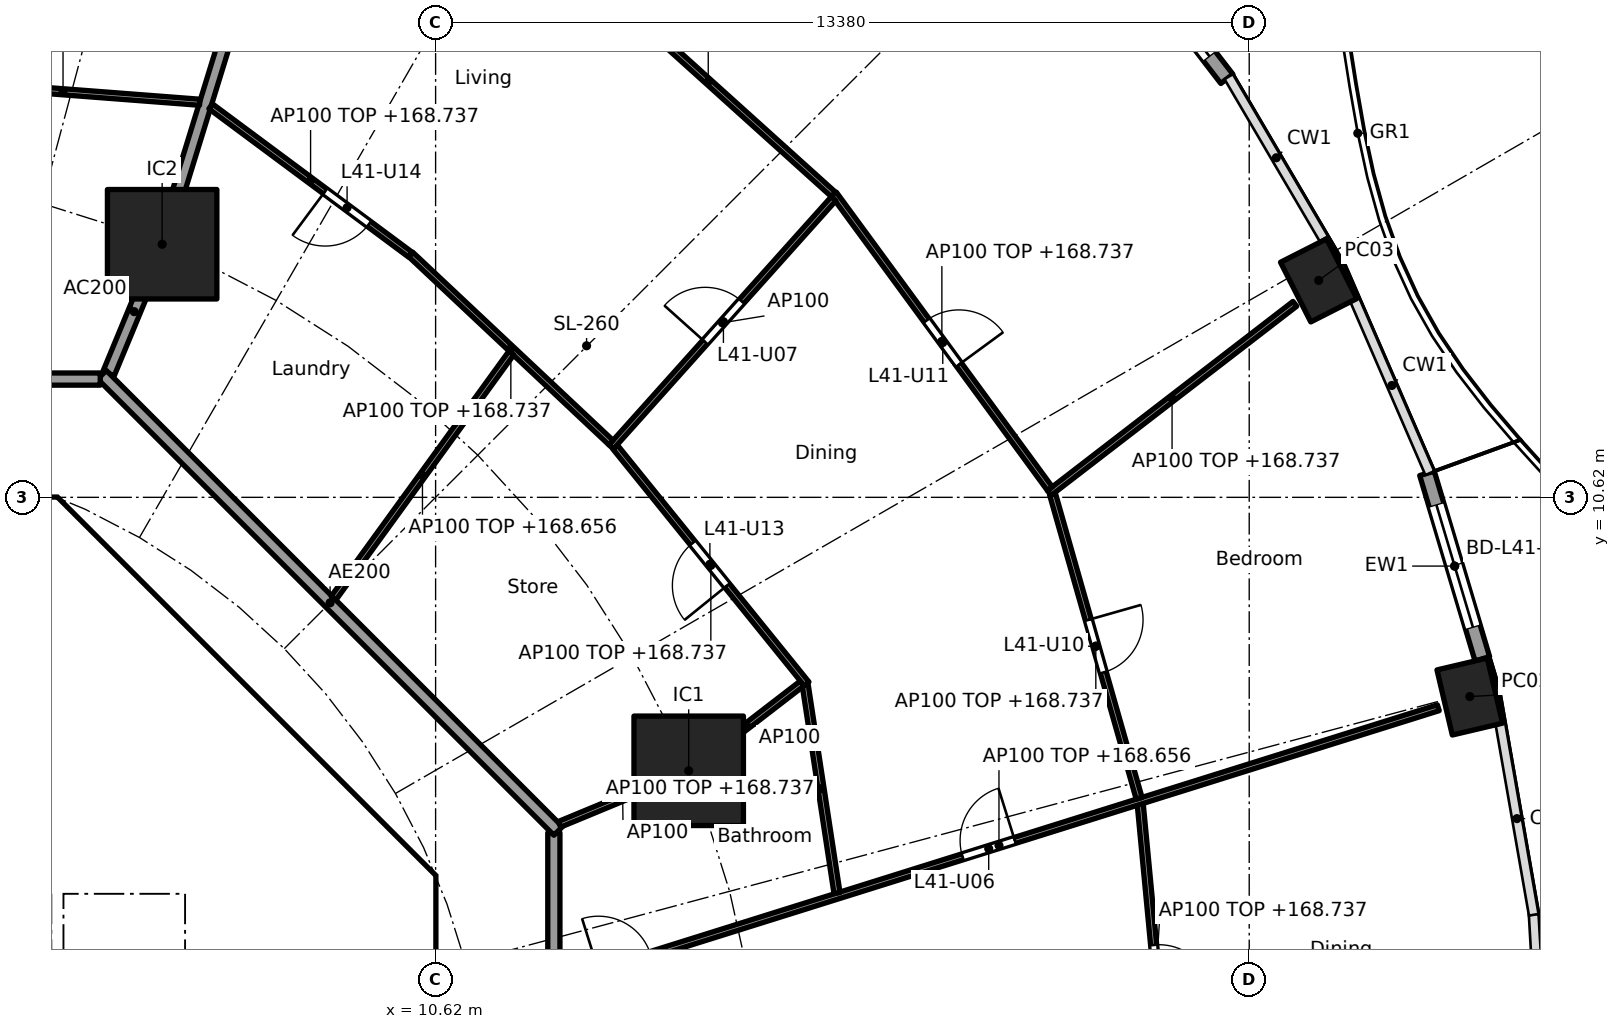
"""IFC4 building model, lengths in metres.
Left out: names, types, materials, properties, quantities, classifications, styles, units other than length and angle.
Written with IfcOpenShell. Run it as: python <this file> out.ifc"""

import sys

from ifc_helpers import new_model, si_unit, direction, frame, frame_2d, origin, origin_2d, place, context, subcontext, project, spatial, polyline, rectangle, hollow_rectangle, outline, extrude, element, fill, save


model = new_model("IFC4")
c1 = context("Model", 3, precision=1e-05, world=origin(), true_north=direction((0.0, 1.0)))
c2 = subcontext(c1, "Body", "Model", "MODEL_VIEW")
j1 = project(units=[si_unit("LENGTHUNIT", "METRE"), si_unit("PLANEANGLEUNIT", "RADIAN")], contexts=[c1])
p1 = place(None, origin())
s1 = spatial("IfcSite", under=j1, at=p1, CompositionType="ELEMENT")
p2 = place(p1, origin())
s2 = spatial("IfcBuilding", under=s1, at=p2, CompositionType="ELEMENT")
p3 = place(p2, frame((0.0, 0.0, 165.9)))
s3 = spatial("IfcBuildingStorey", under=s2, at=p3, CompositionType="ELEMENT", Elevation=165.9)
for number, where, z_axis, x_axis in (
    (1, (27.627, 7.344, -0.26), (0.0, 0.0, 1.0), (-0.229, 0.973, 0.0)),
    (2, (25.142, 14.188, -0.26), (0.0, 0.0, 1.0), (-0.452, 0.892, 0.0)),
):
    element("IfcColumn", number, at=place(p3, frame(where, z_axis=z_axis, x_axis=x_axis)), inside=s3, PredefinedType="COLUMN", context=c2, shape_type="SweptSolid", body=[
        extrude(hollow_rectangle(XDim=1.1, YDim=0.85, WallThickness=0.036, at=origin_2d()), origin(), (0.0, 0.0, 1.0), 3.96),
    ])
for number, where, z_axis, x_axis in (
    (3, (14.782, 6.123, 0.0), (0.0, 0.0, 1.0), (1.0, 0.0, 0.0)),
    (4, (6.123, 14.782, 0.0), (0.0, 0.0, 1.0), (1.0, 0.0, 0.0)),
):
    element("IfcColumn", number, at=place(p3, frame(where, z_axis=z_axis, x_axis=x_axis)), inside=s3, PredefinedType="COLUMN", context=c2, shape_type="SweptSolid", body=[
        extrude(rectangle(XDim=1.8, YDim=1.8, at=origin_2d()), origin(), (0.0, 0.0, 1.0), 3.7),
    ])
p4 = place(p3, frame((26.924, 11.014, 0.0), z_axis=(0.0, 0.0, 1.0), x_axis=(0.28584838049, -0.958274857946, 0.0)))
e5 = element("IfcWall", 5, at=p4, inside=s3, PredefinedType="SOLIDWALL", context=c2, shape_type="SweptSolid", body=[
    extrude(rectangle(XDim=3.182, YDim=0.25, at=frame_2d((1.591, 0.0))), origin(), (0.0, 0.0, 1.0), 3.44),
])
p5 = place(p4, frame((0.541, 0.0, 0.0)))
e6 = element("IfcOpeningElement", 6, at=p5, cuts=e5, PredefinedType="OPENING", context=c2, shape_type="SweptSolid", body=[
    extrude(rectangle(XDim=2.1, YDim=2.4, at=frame_2d((1.05, 1.2))), frame((0.0, 0.135, 0.0), z_axis=(0.0, -1.0, 0.0), x_axis=(1.0, 0.0, 0.0)), (0.0, 0.0, 1.0), 0.27),
])
p6 = place(p3, frame((21.78, 19.906, 0.0), z_axis=(0.0, 0.0, 1.0), x_axis=(0.610437428894, -0.79206448311, 0.0)))
e7 = element("IfcWall", 7, at=p6, inside=s3, PredefinedType="SOLIDWALL", context=c2, shape_type="SweptSolid", body=[
    extrude(rectangle(XDim=3.035, YDim=0.25, at=frame_2d((1.518, 0.0))), origin(), (0.0, 0.0, 1.0), 3.44),
])
p7 = place(p6, frame((0.468, 0.0, 0.0)))
e8 = element("IfcOpeningElement", 8, at=p7, cuts=e7, PredefinedType="OPENING", context=c2, shape_type="SweptSolid", body=[
    extrude(rectangle(XDim=2.1, YDim=2.4, at=frame_2d((1.05, 1.2))), frame((0.0, 0.135, 0.0), z_axis=(0.0, -1.0, 0.0), x_axis=(1.0, 0.0, 0.0)), (0.0, 0.0, 1.0), 0.27),
])
p8 = place(p3, frame((9.988, 4.613, 0.0), z_axis=(0.0, 0.0, 1.0), x_axis=(-0.707106781187, 0.707106781187, 0.0)))
e9 = element("IfcWall", 9, at=p8, inside=s3, PredefinedType="SHEAR", context=c2, shape_type="SweptSolid", body=[
    extrude(rectangle(XDim=7.602, YDim=0.6, at=frame_2d((3.801, 0.0))), origin(), (0.0, 0.0, 1.0), 3.44),
])
p9 = place(p8, frame((3.201, 0.0, 0.0)))
e10 = element("IfcOpeningElement", 10, at=p9, cuts=e9, PredefinedType="OPENING", context=c2, shape_type="SweptSolid", body=[
    extrude(rectangle(XDim=1.2, YDim=2.1, at=frame_2d((0.6, 1.05))), frame((0.0, 0.31, 0.0), z_axis=(0.0, -1.0, 0.0), x_axis=(1.0, 0.0, 0.0)), (0.0, 0.0, 1.0), 0.62),
])
p10 = place(p3, frame((6.7, 4.0, 0.0), z_axis=(0.0, 0.0, 1.0), x_axis=(1.0, 0.0, 0.0)))
e11 = element("IfcWall", 11, at=p10, inside=s3, PredefinedType="SOLIDWALL", context=c2, shape_type="SweptSolid", body=[
    extrude(rectangle(XDim=3.325, YDim=0.2, at=frame_2d((1.662, 0.0))), origin(), (0.0, 0.0, 1.0), 3.44),
])
p11 = place(p10, frame((1.25, 0.0, 0.0)))
e12 = element("IfcOpeningElement", 12, at=p11, cuts=e11, PredefinedType="OPENING", context=c2, shape_type="SweptSolid", body=[
    extrude(rectangle(XDim=1.1, YDim=2.1, at=frame_2d((0.55, 1.05))), frame((0.0, 0.11, 0.0), z_axis=(0.0, -1.0, 0.0), x_axis=(1.0, 0.0, 0.0)), (0.0, 0.0, 1.0), 0.22),
])
p12 = place(p3, origin())
e13 = element("IfcWall", 13, at=p12, inside=s3, PredefinedType="SHEAR", context=c2, shape_type="SweptSolid", body=[
    extrude(outline(polyline([(-4.152, 10.025), (-4.401, 9.776), (-4.825, 10.2), (-4.401, 10.625), (4.401, 10.625), (4.825, 10.2), (4.401, 9.776), (4.152, 10.025), (-4.152, 10.025)])), origin(), (0.0, 0.0, 1.0), 3.44),
])
p13 = place(p3, origin())
e14 = element("IfcWall", 14, at=p13, inside=s3, PredefinedType="SHEAR", context=c2, shape_type="SweptSolid", body=[
    extrude(outline(polyline([(9.776, -4.401), (10.025, -4.152), (10.025, -3.801), (10.025, 4.152), (9.776, 4.401), (10.2, 4.825), (10.625, 4.401), (10.625, -4.401), (10.2, -4.825), (9.776, -4.401)])), origin(), (0.0, 0.0, 1.0), 3.44),
])
p14 = place(p3, origin())
e15 = element("IfcWall", 15, at=p14, inside=s3, PredefinedType="SOLIDWALL", context=c2, shape_type="SweptSolid", body=[
    extrude(outline(polyline([(-6.7, 4.3), (6.7, 4.3), (6.7, 2.1), (6.5, 2.1), (6.5, 4.1), (4.5, 4.1), (4.5, 2.1), (4.3, 2.1), (4.3, 4.1), (2.3, 4.1), (2.3, 2.1), (2.1, 2.1), (2.1, 4.1), (0.1, 4.1), (0.1, 2.1), (-0.1, 2.1), (-0.1, 4.1), (-6.5, 4.1), (-6.5, 2.1), (-6.7, 2.1), (-6.7, 4.3)])), origin(), (0.0, 0.0, 1.0), 3.44),
])
p15 = place(p3, origin())
e16 = element("IfcWall", 16, at=p15, inside=s3, PredefinedType="SOLIDWALL", context=c2, shape_type="SweptSolid", body=[
    extrude(outline(polyline([(7.025, -3.9), (6.7, -3.9), (6.7, 3.9), (7.025, 3.9), (7.025, -3.9)])), origin(), (0.0, 0.0, 1.0), 3.44),
])
p16 = place(p3, frame((5.243, 12.657, 0.0), z_axis=(0.0, 0.0, 1.0), x_axis=(0.382747093259, 0.923853160736, 0.0)))
e17 = element("IfcWall", 17, at=p16, inside=s3, PredefinedType="PARTITIONING", context=c2, shape_type="SweptSolid", body=[
    extrude(rectangle(XDim=2.2, YDim=0.2, at=frame_2d((1.1, 0.0))), origin(), (0.0, 0.0, 1.0), 3.44),
])
p17 = place(p3, frame((6.138, 14.83, 0.0), z_axis=(0.0, 0.0, 1.0), x_axis=(0.294818517221, 0.955553264818, 0.0)))
e18 = element("IfcWall", 18, at=p17, inside=s3, PredefinedType="PARTITIONING", context=c2, shape_type="SweptSolid", body=[
    extrude(rectangle(XDim=12.619, YDim=0.2, at=frame_2d((6.31, 0.0))), origin(), (0.0, 0.0, 1.0), 2.837),
])
p18 = place(p3, frame((12.565, -5.104, 0.0), z_axis=(0.0, 0.0, 1.0), x_axis=(0.0, 1.0, 0.0)))
e19 = element("IfcWall", 19, at=p18, inside=s3, PredefinedType="PARTITIONING", context=c2, shape_type="SweptSolid", body=[
    extrude(rectangle(XDim=10.209, YDim=0.2, at=frame_2d((5.104, 0.0))), origin(), (0.0, 0.0, 1.0), 3.44),
])
p19 = place(p18, frame((5.906, 0.0, 0.0)))
e20 = element("IfcOpeningElement", 20, at=p19, cuts=e19, PredefinedType="OPENING", context=c2, shape_type="SweptSolid", body=[
    extrude(rectangle(XDim=1.0, YDim=2.1, at=frame_2d((0.5, 1.05))), frame((0.0, 0.11, 0.0), z_axis=(0.0, -1.0, 0.0), x_axis=(1.0, 0.0, 0.0)), (0.0, 0.0, 1.0), 0.22),
])
p20 = place(p3, frame((12.635, 5.134, 0.0), z_axis=(0.0, 0.0, 1.0), x_axis=(-0.707106781187, 0.707106781187, 0.0)))
e21 = element("IfcWall", 21, at=p20, inside=s3, PredefinedType="PARTITIONING", context=c2, shape_type="SweptSolid", body=[
    extrude(rectangle(XDim=10.609, YDim=0.2, at=frame_2d((5.305, 0.0))), origin(), (0.0, 0.0, 1.0), 3.44),
])
p21 = place(p3, frame((5.104, 12.565, 0.0), z_axis=(0.0, 0.0, 1.0), x_axis=(-1.0, 0.0, 0.0)))
e22 = element("IfcWall", 22, at=p21, inside=s3, PredefinedType="PARTITIONING", context=c2, shape_type="SweptSolid", body=[
    extrude(rectangle(XDim=10.409, YDim=0.2, at=frame_2d((5.205, 0.0))), origin(), (0.0, 0.0, 1.0), 3.44),
])
p22 = place(p21, frame((6.339, 0.0, 0.0)))
e23 = element("IfcOpeningElement", 23, at=p22, cuts=e22, PredefinedType="OPENING", context=c2, shape_type="SweptSolid", body=[
    extrude(rectangle(XDim=1.0, YDim=2.1, at=frame_2d((0.5, 1.05))), frame((0.0, 0.11, 0.0), z_axis=(0.0, -1.0, 0.0), x_axis=(1.0, 0.0, 0.0)), (0.0, 0.0, 1.0), 0.22),
])
p23 = place(p3, frame((22.734, 0.05, 0.0), z_axis=(0.0, 0.0, 1.0), x_axis=(-0.094923312677, 0.995484587882, 0.0)))
e24 = element("IfcWall", 24, at=p23, inside=s3, PredefinedType="PARTITIONING", context=c2, shape_type="SweptSolid", body=[
    extrude(rectangle(XDim=5.548, YDim=0.1, at=frame_2d((2.774, 0.0))), origin(), (0.0, 0.0, 1.0), 2.837),
])
p24 = place(p23, frame((2.324, 0.0, 0.0)))
e25 = element("IfcOpeningElement", 25, at=p24, cuts=e24, PredefinedType="OPENING", context=c2, shape_type="SweptSolid", body=[
    extrude(rectangle(XDim=0.9, YDim=2.1, at=frame_2d((0.45, 1.05))), frame((0.0, 0.06, 0.0), z_axis=(0.0, -1.0, 0.0), x_axis=(1.0, 0.0, 0.0)), (0.0, 0.0, 1.0), 0.12),
])
p25 = place(p3, frame((12.66, 2.632, 0.0), z_axis=(0.0, 0.0, 1.0), x_axis=(0.954248738607, 0.299013954302, 0.0)))
e26 = element("IfcWall", 26, at=p25, inside=s3, PredefinedType="PARTITIONING", context=c2, shape_type="SweptSolid", body=[
    extrude(rectangle(XDim=15.142, YDim=0.1, at=frame_2d((7.571, 0.0))), origin(), (0.0, 0.0, 1.0), 2.756),
])
p26 = place(p25, frame((0.669, 0.0, 0.0)))
e27 = element("IfcOpeningElement", 27, at=p26, cuts=e26, PredefinedType="OPENING", context=c2, shape_type="SweptSolid", body=[
    extrude(rectangle(XDim=0.9, YDim=2.1, at=frame_2d((0.45, 1.05))), frame((0.0, 0.06, 0.0), z_axis=(0.0, -1.0, 0.0), x_axis=(1.0, 0.0, 0.0)), (0.0, 0.0, 1.0), 0.12),
])
p27 = place(p25, frame((6.944, 0.0, 0.0)))
e28 = element("IfcOpeningElement", 28, at=p27, cuts=e26, PredefinedType="OPENING", context=c2, shape_type="SweptSolid", body=[
    extrude(rectangle(XDim=0.9, YDim=2.1, at=frame_2d((0.45, 1.05))), frame((0.0, 0.06, 0.0), z_axis=(0.0, -1.0, 0.0), x_axis=(1.0, 0.0, 0.0)), (0.0, 0.0, 1.0), 0.12),
])
p28 = place(p3, frame((17.221, 4.113, 0.0), z_axis=(0.0, 0.0, 1.0), x_axis=(-0.151078880423, 0.988521710379, 0.0)))
e29 = element("IfcWall", 29, at=p28, inside=s3, PredefinedType="PARTITIONING", context=c2, shape_type="SweptSolid", body=[
    extrude(rectangle(XDim=3.469, YDim=0.1, at=frame_2d((1.735, 0.0))), origin(), (0.0, 0.0, 1.0), 2.837),
])
p29 = place(p3, frame((22.189, 5.67, 0.0), z_axis=(0.0, 0.0, 1.0), x_axis=(-0.273815967041, 0.961782104322, 0.0)))
e30 = element("IfcWall", 30, at=p29, inside=s3, PredefinedType="PARTITIONING", context=c2, shape_type="SweptSolid", body=[
    extrude(rectangle(XDim=5.202, YDim=0.1, at=frame_2d((2.601, 0.0))), origin(), (0.0, 0.0, 1.0), 2.837),
])
p30 = place(p29, frame((2.151, 0.0, 0.0)))
e31 = element("IfcOpeningElement", 31, at=p30, cuts=e30, PredefinedType="OPENING", context=c2, shape_type="SweptSolid", body=[
    extrude(rectangle(XDim=0.9, YDim=2.1, at=frame_2d((0.45, 1.05))), frame((0.0, 0.06, 0.0), z_axis=(0.0, -1.0, 0.0), x_axis=(1.0, 0.0, 0.0)), (0.0, 0.0, 1.0), 0.12),
])
p31 = place(p3, frame((12.657, 5.243, 0.0), z_axis=(0.0, 0.0, 1.0), x_axis=(0.923826362943, 0.382811769845, 0.0)))
e32 = element("IfcWall", 32, at=p31, inside=s3, PredefinedType="PARTITIONING", context=c2, shape_type="SweptSolid", body=[
    extrude(rectangle(XDim=2.25, YDim=0.1, at=frame_2d((1.125, 0.0))), origin(), (0.0, 0.0, 1.0), 3.44),
])
p32 = place(p3, frame((14.822, 6.154, 0.0), z_axis=(0.0, 0.0, 1.0), x_axis=(0.792226528082, 0.610227111987, 0.0)))
e33 = element("IfcWall", 33, at=p32, inside=s3, PredefinedType="PARTITIONING", context=c2, shape_type="SweptSolid", body=[
    extrude(rectangle(XDim=2.307, YDim=0.1, at=frame_2d((1.154, 0.0))), origin(), (0.0, 0.0, 1.0), 3.44),
])
p33 = place(p3, frame((16.721, 7.553, 0.0), z_axis=(0.0, 0.0, 1.0), x_axis=(-0.628753513808, 0.777604667472, 0.0)))
e34 = element("IfcWall", 34, at=p33, inside=s3, PredefinedType="PARTITIONING", context=c2, shape_type="SweptSolid", body=[
    extrude(rectangle(XDim=5.007, YDim=0.1, at=frame_2d((2.504, 0.0))), origin(), (0.0, 0.0, 1.0), 2.837),
])
p34 = place(p33, frame((2.079, 0.0, 0.0)))
e35 = element("IfcOpeningElement", 35, at=p34, cuts=e34, PredefinedType="OPENING", context=c2, shape_type="SweptSolid", body=[
    extrude(rectangle(XDim=0.9, YDim=2.1, at=frame_2d((0.45, 1.05))), frame((0.0, 0.06, 0.0), z_axis=(0.0, -1.0, 0.0), x_axis=(1.0, 0.0, 0.0)), (0.0, 0.0, 1.0), 0.12),
])
p35 = place(p3, frame((20.712, 10.691, 0.0), z_axis=(0.0, 0.0, 1.0), x_axis=(0.79220362146, 0.610256849323, 0.0)))
e36 = element("IfcWall", 36, at=p35, inside=s3, PredefinedType="PARTITIONING", context=c2, shape_type="SweptSolid", body=[
    extrude(rectangle(XDim=5.098, YDim=0.1, at=frame_2d((2.549, 0.0))), origin(), (0.0, 0.0, 1.0), 2.837),
])
p36 = place(p3, frame((20.722, 10.762, 0.0), z_axis=(0.0, 0.0, 1.0), x_axis=(-0.591124135033, 0.806580595466, 0.0)))
e37 = element("IfcWall", 37, at=p36, inside=s3, PredefinedType="PARTITIONING", context=c2, shape_type="SweptSolid", body=[
    extrude(rectangle(XDim=6.01, YDim=0.1, at=frame_2d((3.005, 0.0))), origin(), (0.0, 0.0, 1.0), 2.837),
])
p37 = place(p36, frame((2.53, 0.0, 0.0)))
e38 = element("IfcOpeningElement", 38, at=p37, cuts=e37, PredefinedType="OPENING", context=c2, shape_type="SweptSolid", body=[
    extrude(rectangle(XDim=0.9, YDim=2.1, at=frame_2d((0.45, 1.05))), frame((0.0, 0.06, 0.0), z_axis=(0.0, -1.0, 0.0), x_axis=(1.0, 0.0, 0.0)), (0.0, 0.0, 1.0), 0.12),
])
p38 = place(p3, frame((13.507, 11.449, 0.0), z_axis=(0.0, 0.0, 1.0), x_axis=(0.667299792168, 0.744789223453, 0.0)))
e39 = element("IfcWall", 39, at=p38, inside=s3, PredefinedType="PARTITIONING", context=c2, shape_type="SweptSolid", body=[
    extrude(rectangle(XDim=5.482, YDim=0.1, at=frame_2d((2.741, 0.0))), origin(), (0.0, 0.0, 1.0), 3.44),
])
p39 = place(p38, frame((2.316, 0.0, 0.0)))
e40 = element("IfcOpeningElement", 40, at=p39, cuts=e39, PredefinedType="OPENING", context=c2, shape_type="SweptSolid", body=[
    extrude(rectangle(XDim=0.9, YDim=2.1, at=frame_2d((0.45, 1.05))), frame((0.0, 0.06, 0.0), z_axis=(0.0, -1.0, 0.0), x_axis=(1.0, 0.0, 0.0)), (0.0, 0.0, 1.0), 0.12),
])
p40 = place(p3, frame((13.504, 11.52, 0.0), z_axis=(0.0, 0.0, 1.0), x_axis=(-0.728883199496, 0.684638066055, 0.0)))
e41 = element("IfcWall", 41, at=p40, inside=s3, PredefinedType="PARTITIONING", context=c2, shape_type="SweptSolid", body=[
    extrude(rectangle(XDim=4.519, YDim=0.1, at=frame_2d((2.26, 0.0))), origin(), (0.0, 0.0, 1.0), 2.837),
])
p41 = place(p3, frame((17.162, 15.603, 0.0), z_axis=(0.0, 0.0, 1.0), x_axis=(-0.742790086539, 0.66952437397, 0.0)))
e42 = element("IfcWall", 42, at=p41, inside=s3, PredefinedType="PARTITIONING", context=c2, shape_type="SweptSolid", body=[
    extrude(rectangle(XDim=5.542, YDim=0.1, at=frame_2d((2.771, 0.0))), origin(), (0.0, 0.0, 1.0), 2.837),
])
p42 = place(p3, frame((8.943, 8.966, 0.0), z_axis=(0.0, 0.0, 1.0), x_axis=(0.587187896734, 0.809450661825, 0.0)))
e43 = element("IfcWall", 43, at=p42, inside=s3, PredefinedType="PARTITIONING", context=c2, shape_type="SweptSolid", body=[
    extrude(rectangle(XDim=4.975, YDim=0.1, at=frame_2d((2.487, 0.0))), origin(), (0.0, 0.0, 1.0), 2.756),
])
p43 = place(p3, frame((10.207, 14.61, 0.0), z_axis=(0.0, 0.0, 1.0), x_axis=(-0.802769141821, 0.596289950394, 0.0)))
e44 = element("IfcWall", 44, at=p43, inside=s3, PredefinedType="PARTITIONING", context=c2, shape_type="SweptSolid", body=[
    extrude(rectangle(XDim=4.092, YDim=0.1, at=frame_2d((2.046, 0.0))), origin(), (0.0, 0.0, 1.0), 2.837),
])
p44 = place(p43, frame((0.848, 0.0, 0.0)))
e45 = element("IfcOpeningElement", 45, at=p44, cuts=e44, PredefinedType="OPENING", context=c2, shape_type="SweptSolid", body=[
    extrude(rectangle(XDim=0.9, YDim=2.1, at=frame_2d((0.45, 1.05))), frame((0.0, 0.06, 0.0), z_axis=(0.0, -1.0, 0.0), x_axis=(1.0, 0.0, 0.0)), (0.0, 0.0, 1.0), 0.12),
])
p45 = place(p3, frame((6.741, 17.117, 0.0), z_axis=(0.0, 0.0, 1.0), x_axis=(-0.997078320723, 0.076386008825, 0.0)))
e46 = element("IfcWall", 46, at=p45, inside=s3, PredefinedType="PARTITIONING", context=c2, shape_type="SweptSolid", body=[
    extrude(rectangle(XDim=4.51, YDim=0.1, at=frame_2d((2.255, 0.0))), origin(), (0.0, 0.0, 1.0), 2.837),
])
p46 = place(p5, origin())
e47 = element("IfcDoor", 47, at=p46, inside=s3, OperationType="SLIDING_TO_LEFT", PredefinedType="DOOR", context=c2, shape_type="SweptSolid", body=[
    extrude(rectangle(XDim=2.1, YDim=2.4, at=frame_2d((1.05, 1.2))), frame((0.0, 0.025, 0.0), z_axis=(0.0, -1.0, 0.0), x_axis=(1.0, 0.0, 0.0)), (0.0, 0.0, 1.0), 0.05),
])
fill(e6, e47)
p47 = place(p7, origin())
e48 = element("IfcDoor", 48, at=p47, inside=s3, OperationType="SLIDING_TO_LEFT", PredefinedType="DOOR", context=c2, shape_type="SweptSolid", body=[
    extrude(rectangle(XDim=2.1, YDim=2.4, at=frame_2d((1.05, 1.2))), frame((0.0, 0.025, 0.0), z_axis=(0.0, -1.0, 0.0), x_axis=(1.0, 0.0, 0.0)), (0.0, 0.0, 1.0), 0.05),
])
fill(e8, e48)
p48 = place(p11, frame((1.1, 0.0, 0.0), x_axis=(-1.0, 0.0, 0.0)))
e49 = element("IfcDoor", 49, at=p48, inside=s3, OperationType="SINGLE_SWING_RIGHT", PredefinedType="DOOR", context=c2, shape_type="SweptSolid", body=[
    extrude(rectangle(XDim=1.1, YDim=2.1, at=frame_2d((0.55, 1.05))), frame((0.0, 0.025, 0.0), z_axis=(0.0, -1.0, 0.0), x_axis=(1.0, 0.0, 0.0)), (0.0, 0.0, 1.0), 0.05),
])
fill(e12, e49)
p49 = place(p9, origin())
e50 = element("IfcDoor", 50, at=p49, inside=s3, OperationType="SINGLE_SWING_LEFT", PredefinedType="DOOR", context=c2, shape_type="SweptSolid", body=[
    extrude(rectangle(XDim=1.2, YDim=2.1, at=frame_2d((0.6, 1.05))), frame((0.0, 0.025, 0.0), z_axis=(0.0, -1.0, 0.0), x_axis=(1.0, 0.0, 0.0)), (0.0, 0.0, 1.0), 0.05),
])
fill(e10, e50)
p50 = place(p27, origin())
e51 = element("IfcDoor", 51, at=p50, inside=s3, OperationType="SINGLE_SWING_RIGHT", PredefinedType="DOOR", context=c2, shape_type="SweptSolid", body=[
    extrude(rectangle(XDim=0.9, YDim=2.1, at=frame_2d((0.45, 1.05))), frame((0.0, 0.025, 0.0), z_axis=(0.0, -1.0, 0.0), x_axis=(1.0, 0.0, 0.0)), (0.0, 0.0, 1.0), 0.05),
])
fill(e28, e51)
p51 = place(p39, origin())
e52 = element("IfcDoor", 52, at=p51, inside=s3, OperationType="SINGLE_SWING_LEFT", PredefinedType="DOOR", context=c2, shape_type="SweptSolid", body=[
    extrude(rectangle(XDim=0.9, YDim=2.1, at=frame_2d((0.45, 1.05))), frame((0.0, 0.025, 0.0), z_axis=(0.0, -1.0, 0.0), x_axis=(1.0, 0.0, 0.0)), (0.0, 0.0, 1.0), 0.05),
])
fill(e40, e52)
p52 = place(p24, frame((0.9, 0.0, 0.0), x_axis=(-1.0, 0.0, 0.0)))
e53 = element("IfcDoor", 53, at=p52, inside=s3, OperationType="SINGLE_SWING_RIGHT", PredefinedType="DOOR", context=c2, shape_type="SweptSolid", body=[
    extrude(rectangle(XDim=0.9, YDim=2.1, at=frame_2d((0.45, 1.05))), frame((0.0, 0.025, 0.0), z_axis=(0.0, -1.0, 0.0), x_axis=(1.0, 0.0, 0.0)), (0.0, 0.0, 1.0), 0.05),
])
fill(e25, e53)
p53 = place(p30, frame((0.9, 0.0, 0.0), x_axis=(-1.0, 0.0, 0.0)))
e54 = element("IfcDoor", 54, at=p53, inside=s3, OperationType="SINGLE_SWING_LEFT", PredefinedType="DOOR", context=c2, shape_type="SweptSolid", body=[
    extrude(rectangle(XDim=0.9, YDim=2.1, at=frame_2d((0.45, 1.05))), frame((0.0, 0.025, 0.0), z_axis=(0.0, -1.0, 0.0), x_axis=(1.0, 0.0, 0.0)), (0.0, 0.0, 1.0), 0.05),
])
fill(e31, e54)
p54 = place(p37, frame((0.9, 0.0, 0.0), x_axis=(-1.0, 0.0, 0.0)))
e55 = element("IfcDoor", 55, at=p54, inside=s3, OperationType="SINGLE_SWING_RIGHT", PredefinedType="DOOR", context=c2, shape_type="SweptSolid", body=[
    extrude(rectangle(XDim=0.9, YDim=2.1, at=frame_2d((0.45, 1.05))), frame((0.0, 0.025, 0.0), z_axis=(0.0, -1.0, 0.0), x_axis=(1.0, 0.0, 0.0)), (0.0, 0.0, 1.0), 0.05),
])
fill(e38, e55)
p55 = place(p34, origin())
e56 = element("IfcDoor", 56, at=p55, inside=s3, OperationType="SINGLE_SWING_LEFT", PredefinedType="DOOR", context=c2, shape_type="SweptSolid", body=[
    extrude(rectangle(XDim=0.9, YDim=2.1, at=frame_2d((0.45, 1.05))), frame((0.0, 0.025, 0.0), z_axis=(0.0, -1.0, 0.0), x_axis=(1.0, 0.0, 0.0)), (0.0, 0.0, 1.0), 0.05),
])
fill(e35, e56)
p56 = place(p44, origin())
e57 = element("IfcDoor", 57, at=p56, inside=s3, OperationType="SINGLE_SWING_RIGHT", PredefinedType="DOOR", context=c2, shape_type="SweptSolid", body=[
    extrude(rectangle(XDim=0.9, YDim=2.1, at=frame_2d((0.45, 1.05))), frame((0.0, 0.025, 0.0), z_axis=(0.0, -1.0, 0.0), x_axis=(1.0, 0.0, 0.0)), (0.0, 0.0, 1.0), 0.05),
])
fill(e45, e57)
save(model, sys.argv[1])
